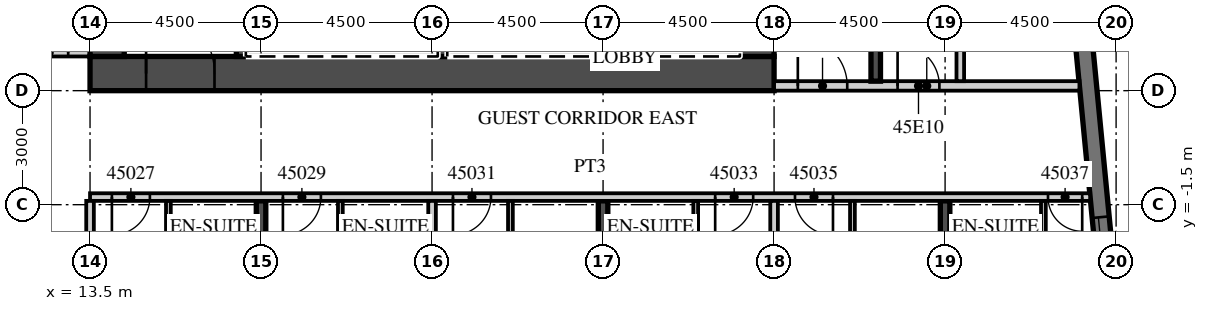
"""IFC4 building model, lengths in metres.
Left out: names, types, materials, properties, quantities, classifications, styles, units other than length and angle.
Written with IfcOpenShell. Run it as: python <this file> out.ifc"""

import sys

from ifc_helpers import new_model, si_unit, direction, frame, frame_2d, origin, place, context, subcontext, project, spatial, rectangle, extrude, element, fill, save


model = new_model("IFC4")
c1 = context("Model", 3, precision=1e-05, world=origin(), true_north=direction((0.0, 1.0)))
c2 = subcontext(c1, "Body", "Model", "MODEL_VIEW")
j1 = project(units=[si_unit("LENGTHUNIT", "METRE"), si_unit("PLANEANGLEUNIT", "RADIAN")], contexts=[c1])
p1 = place(None, origin())
s1 = spatial("IfcSite", under=j1, at=p1, CompositionType="ELEMENT")
p2 = place(p1, origin())
s2 = spatial("IfcBuilding", under=s1, at=p2, CompositionType="ELEMENT")
p3 = place(p2, frame((0.0, 0.0, 190.0)))
s3 = spatial("IfcBuildingStorey", under=s2, at=p3, CompositionType="ELEMENT", Elevation=190.0)
p4 = place(p3, frame((18.0, -19.245, 0.0), z_axis=(0.0, 0.0, 1.0), x_axis=(0.0, 1.0, 0.0)))
e1 = element("IfcWall", 1, at=p4, inside=s3, PredefinedType="SHEAR", context=c2, shape_type="SweptSolid", body=[
    extrude(rectangle(XDim=17.845, YDim=0.25, at=frame_2d((8.923, 0.0))), origin(), (0.0, 0.0, 1.0), 3.3),
])
p5 = place(p3, frame((27.0, -18.379, 0.0), z_axis=(0.0, 0.0, 1.0), x_axis=(0.0, 1.0, 0.0)))
e2 = element("IfcWall", 2, at=p5, inside=s3, PredefinedType="SHEAR", context=c2, shape_type="SweptSolid", body=[
    extrude(rectangle(XDim=16.979, YDim=0.25, at=frame_2d((8.489, 0.0))), origin(), (0.0, 0.0, 1.0), 3.3),
])
p6 = place(p3, frame((36.0, -17.512, 0.0), z_axis=(0.0, 0.0, 1.0), x_axis=(0.0, 1.0, 0.0)))
e3 = element("IfcWall", 3, at=p6, inside=s3, PredefinedType="SHEAR", context=c2, shape_type="SweptSolid", body=[
    extrude(rectangle(XDim=16.112, YDim=0.25, at=frame_2d((8.056, 0.0))), origin(), (0.0, 0.0, 1.0), 3.3),
])
p7 = place(p3, frame((41.214, -13.466, 0.0), z_axis=(0.0, 0.0, 1.0), x_axis=(-0.095847314626, 0.995396047952, 0.0)))
e4 = element("IfcWall", 4, at=p7, inside=s3, PredefinedType="SOLIDWALL", context=c2, shape_type="SweptSolid", body=[
    extrude(rectangle(XDim=34.0, YDim=0.45, at=frame_2d((17.0, 0.0))), origin(), (0.0, 0.0, 1.0), 3.02),
])
p8 = place(p7, frame((3.869, 0.0, 0.45)))
e5 = element("IfcOpeningElement", 5, at=p8, cuts=e4, PredefinedType="OPENING", context=c2, shape_type="SweptSolid", body=[
    extrude(rectangle(XDim=3.3, YDim=2.25, at=frame_2d((1.65, 1.125))), frame((0.0, 0.235, 0.0), z_axis=(0.0, -1.0, 0.0), x_axis=(1.0, 0.0, 0.0)), (0.0, 0.0, 1.0), 0.47),
])
p9 = place(p7, frame((8.39, 0.0, 0.45)))
e6 = element("IfcOpeningElement", 6, at=p9, cuts=e4, PredefinedType="OPENING", context=c2, shape_type="SweptSolid", body=[
    extrude(rectangle(XDim=3.3, YDim=2.25, at=frame_2d((1.65, 1.125))), frame((0.0, 0.235, 0.0), z_axis=(0.0, -1.0, 0.0), x_axis=(1.0, 0.0, 0.0)), (0.0, 0.0, 1.0), 0.47),
])
p10 = place(p3, frame((-13.5, 2.5, 0.0), z_axis=(0.0, 0.0, 1.0), x_axis=(1.0, 0.0, 0.0)))
e7 = element("IfcWall", 7, at=p10, inside=s3, PredefinedType="PARTITIONING", context=c2, shape_type="SweptSolid", body=[
    extrude(rectangle(XDim=27.0, YDim=0.2, at=frame_2d((13.5, 0.0))), origin(), (0.0, 0.0, 1.0), 3.02),
])
p11 = place(p10, frame((0.575, 0.0, 0.0)))
e8 = element("IfcOpeningElement", 8, at=p11, cuts=e7, PredefinedType="OPENING", context=c2, shape_type="SweptSolid", body=[
    extrude(rectangle(XDim=1.0, YDim=2.1, at=frame_2d((0.5, 1.05))), frame((0.0, 0.11, 0.0), z_axis=(0.0, -1.0, 0.0), x_axis=(1.0, 0.0, 0.0)), (0.0, 0.0, 1.0), 0.22),
])
p12 = place(p10, frame((9.863, 0.0, 0.0)))
e9 = element("IfcOpeningElement", 9, at=p12, cuts=e7, PredefinedType="OPENING", context=c2, shape_type="SweptSolid", body=[
    extrude(rectangle(XDim=1.2, YDim=2.1, at=frame_2d((0.6, 1.05))), frame((0.0, 0.11, 0.0), z_axis=(0.0, -1.0, 0.0), x_axis=(1.0, 0.0, 0.0)), (0.0, 0.0, 1.0), 0.22),
])
p13 = place(p10, frame((18.862, 0.0, 0.0)))
e10 = element("IfcOpeningElement", 10, at=p13, cuts=e7, PredefinedType="OPENING", context=c2, shape_type="SweptSolid", body=[
    extrude(rectangle(XDim=1.2, YDim=2.1, at=frame_2d((0.6, 1.05))), frame((0.0, 0.11, 0.0), z_axis=(0.0, -1.0, 0.0), x_axis=(1.0, 0.0, 0.0)), (0.0, 0.0, 1.0), 0.22),
])
p14 = place(p10, frame((25.425, 0.0, 0.0)))
e11 = element("IfcOpeningElement", 11, at=p14, cuts=e7, PredefinedType="OPENING", context=c2, shape_type="SweptSolid", body=[
    extrude(rectangle(XDim=1.0, YDim=2.1, at=frame_2d((0.5, 1.05))), frame((0.0, 0.11, 0.0), z_axis=(0.0, -1.0, 0.0), x_axis=(1.0, 0.0, 0.0)), (0.0, 0.0, 1.0), 0.22),
])
p15 = place(p3, frame((13.5, -1.3, 0.0), z_axis=(0.0, 0.0, 1.0), x_axis=(1.0, 0.0, 0.0)))
e12 = element("IfcWall", 12, at=p15, inside=s3, PredefinedType="PARTITIONING", context=c2, shape_type="SweptSolid", body=[
    extrude(rectangle(XDim=26.317, YDim=0.2, at=frame_2d((13.158, 0.0))), origin(), (0.0, 0.0, 1.0), 3.02),
])
p16 = place(p15, frame((0.575, 0.0, 0.0)))
e13 = element("IfcOpeningElement", 13, at=p16, cuts=e12, PredefinedType="OPENING", context=c2, shape_type="SweptSolid", body=[
    extrude(rectangle(XDim=1.0, YDim=2.1, at=frame_2d((0.5, 1.05))), frame((0.0, 0.11, 0.0), z_axis=(0.0, -1.0, 0.0), x_axis=(1.0, 0.0, 0.0)), (0.0, 0.0, 1.0), 0.22),
])
p17 = place(p15, frame((5.075, 0.0, 0.0)))
e14 = element("IfcOpeningElement", 14, at=p17, cuts=e12, PredefinedType="OPENING", context=c2, shape_type="SweptSolid", body=[
    extrude(rectangle(XDim=1.0, YDim=2.1, at=frame_2d((0.5, 1.05))), frame((0.0, 0.11, 0.0), z_axis=(0.0, -1.0, 0.0), x_axis=(1.0, 0.0, 0.0)), (0.0, 0.0, 1.0), 0.22),
])
p18 = place(p15, frame((9.55, 0.0, 0.0)))
e15 = element("IfcOpeningElement", 15, at=p18, cuts=e12, PredefinedType="OPENING", context=c2, shape_type="SweptSolid", body=[
    extrude(rectangle(XDim=1.0, YDim=2.1, at=frame_2d((0.5, 1.05))), frame((0.0, 0.11, 0.0), z_axis=(0.0, -1.0, 0.0), x_axis=(1.0, 0.0, 0.0)), (0.0, 0.0, 1.0), 0.22),
])
p19 = place(p15, frame((16.45, 0.0, 0.0)))
e16 = element("IfcOpeningElement", 16, at=p19, cuts=e12, PredefinedType="OPENING", context=c2, shape_type="SweptSolid", body=[
    extrude(rectangle(XDim=1.0, YDim=2.1, at=frame_2d((0.5, 1.05))), frame((0.0, 0.11, 0.0), z_axis=(0.0, -1.0, 0.0), x_axis=(1.0, 0.0, 0.0)), (0.0, 0.0, 1.0), 0.22),
])
p20 = place(p15, frame((18.55, 0.0, 0.0)))
e17 = element("IfcOpeningElement", 17, at=p20, cuts=e12, PredefinedType="OPENING", context=c2, shape_type="SweptSolid", body=[
    extrude(rectangle(XDim=1.0, YDim=2.1, at=frame_2d((0.5, 1.05))), frame((0.0, 0.11, 0.0), z_axis=(0.0, -1.0, 0.0), x_axis=(1.0, 0.0, 0.0)), (0.0, 0.0, 1.0), 0.22),
])
p21 = place(p15, frame((25.208, 0.0, 0.0)))
e18 = element("IfcOpeningElement", 18, at=p21, cuts=e12, PredefinedType="OPENING", context=c2, shape_type="SweptSolid", body=[
    extrude(rectangle(XDim=0.9, YDim=2.1, at=frame_2d((0.45, 1.05))), frame((0.0, 0.11, 0.0), z_axis=(0.0, -1.0, 0.0), x_axis=(1.0, 0.0, 0.0)), (0.0, 0.0, 1.0), 0.22),
])
p22 = place(p3, frame((13.5, -19.701, 0.0), z_axis=(0.0, 0.0, 1.0), x_axis=(0.0, 1.0, 0.0)))
e19 = element("IfcWall", 19, at=p22, inside=s3, PredefinedType="PARTITIONING", context=c2, shape_type="SweptSolid", body=[
    extrude(rectangle(XDim=18.301, YDim=0.2, at=frame_2d((9.15, 0.0))), origin(), (0.0, 0.0, 1.0), 3.02),
])
p23 = place(p3, frame((15.562, -5.125, 0.0), z_axis=(0.0, 0.0, 1.0), x_axis=(0.0, 1.0, 0.0)))
e20 = element("IfcWall", 20, at=p23, inside=s3, PredefinedType="PARTITIONING", context=c2, shape_type="SweptSolid", body=[
    extrude(rectangle(XDim=3.725, YDim=0.125, at=frame_2d((1.863, 0.0))), origin(), (0.0, 0.0, 1.0), 3.02),
])
p24 = place(p23, frame((0.375, 0.0, 0.0)))
e21 = element("IfcOpeningElement", 21, at=p24, cuts=e20, PredefinedType="OPENING", context=c2, shape_type="SweptSolid", body=[
    extrude(rectangle(XDim=0.9, YDim=2.1, at=frame_2d((0.45, 1.05))), frame((0.0, 0.073, 0.0), z_axis=(0.0, -1.0, 0.0), x_axis=(1.0, 0.0, 0.0)), (0.0, 0.0, 1.0), 0.145),
])
p25 = place(p3, frame((22.5, -18.834, 0.0), z_axis=(0.0, 0.0, 1.0), x_axis=(0.0, 1.0, 0.0)))
e22 = element("IfcWall", 22, at=p25, inside=s3, PredefinedType="PARTITIONING", context=c2, shape_type="SweptSolid", body=[
    extrude(rectangle(XDim=17.434, YDim=0.2, at=frame_2d((8.717, 0.0))), origin(), (0.0, 0.0, 1.0), 3.02),
])
p26 = place(p3, frame((20.087, -5.125, 0.0), z_axis=(0.0, 0.0, 1.0), x_axis=(0.0, 1.0, 0.0)))
e23 = element("IfcWall", 23, at=p26, inside=s3, PredefinedType="PARTITIONING", context=c2, shape_type="SweptSolid", body=[
    extrude(rectangle(XDim=3.725, YDim=0.125, at=frame_2d((1.863, 0.0))), origin(), (0.0, 0.0, 1.0), 3.02),
])
p27 = place(p26, frame((0.375, 0.0, 0.0)))
e24 = element("IfcOpeningElement", 24, at=p27, cuts=e23, PredefinedType="OPENING", context=c2, shape_type="SweptSolid", body=[
    extrude(rectangle(XDim=0.9, YDim=2.1, at=frame_2d((0.45, 1.05))), frame((0.0, 0.073, 0.0), z_axis=(0.0, -1.0, 0.0), x_axis=(1.0, 0.0, 0.0)), (0.0, 0.0, 1.0), 0.145),
])
p28 = place(p3, frame((24.562, -5.125, 0.0), z_axis=(0.0, 0.0, 1.0), x_axis=(0.0, 1.0, 0.0)))
e25 = element("IfcWall", 25, at=p28, inside=s3, PredefinedType="PARTITIONING", context=c2, shape_type="SweptSolid", body=[
    extrude(rectangle(XDim=3.725, YDim=0.125, at=frame_2d((1.863, 0.0))), origin(), (0.0, 0.0, 1.0), 3.02),
])
p29 = place(p28, frame((0.375, 0.0, 0.0)))
e26 = element("IfcOpeningElement", 26, at=p29, cuts=e25, PredefinedType="OPENING", context=c2, shape_type="SweptSolid", body=[
    extrude(rectangle(XDim=0.9, YDim=2.1, at=frame_2d((0.45, 1.05))), frame((0.0, 0.073, 0.0), z_axis=(0.0, -1.0, 0.0), x_axis=(1.0, 0.0, 0.0)), (0.0, 0.0, 1.0), 0.145),
])
p30 = place(p3, frame((31.5, -17.967, 0.0), z_axis=(0.0, 0.0, 1.0), x_axis=(0.0, 1.0, 0.0)))
e27 = element("IfcWall", 27, at=p30, inside=s3, PredefinedType="PARTITIONING", context=c2, shape_type="SweptSolid", body=[
    extrude(rectangle(XDim=16.567, YDim=0.2, at=frame_2d((8.284, 0.0))), origin(), (0.0, 0.0, 1.0), 3.02),
])
p31 = place(p3, frame((29.438, -5.125, 0.0), z_axis=(0.0, 0.0, 1.0), x_axis=(0.0, 1.0, 0.0)))
e28 = element("IfcWall", 28, at=p31, inside=s3, PredefinedType="PARTITIONING", context=c2, shape_type="SweptSolid", body=[
    extrude(rectangle(XDim=3.725, YDim=0.125, at=frame_2d((1.863, 0.0))), origin(), (0.0, 0.0, 1.0), 3.02),
])
p32 = place(p31, frame((0.375, 0.0, 0.0)))
e29 = element("IfcOpeningElement", 29, at=p32, cuts=e28, PredefinedType="OPENING", context=c2, shape_type="SweptSolid", body=[
    extrude(rectangle(XDim=0.9, YDim=2.1, at=frame_2d((0.45, 1.05))), frame((0.0, 0.073, 0.0), z_axis=(0.0, -1.0, 0.0), x_axis=(1.0, 0.0, 0.0)), (0.0, 0.0, 1.0), 0.145),
])
p33 = place(p3, frame((33.562, -5.125, 0.0), z_axis=(0.0, 0.0, 1.0), x_axis=(0.0, 1.0, 0.0)))
e30 = element("IfcWall", 30, at=p33, inside=s3, PredefinedType="PARTITIONING", context=c2, shape_type="SweptSolid", body=[
    extrude(rectangle(XDim=3.725, YDim=0.125, at=frame_2d((1.863, 0.0))), origin(), (0.0, 0.0, 1.0), 3.02),
])
p34 = place(p33, frame((0.375, 0.0, 0.0)))
e31 = element("IfcOpeningElement", 31, at=p34, cuts=e30, PredefinedType="OPENING", context=c2, shape_type="SweptSolid", body=[
    extrude(rectangle(XDim=0.9, YDim=2.1, at=frame_2d((0.45, 1.05))), frame((0.0, 0.073, 0.0), z_axis=(0.0, -1.0, 0.0), x_axis=(1.0, 0.0, 0.0)), (0.0, 0.0, 1.0), 0.145),
])
p35 = place(p3, frame((38.587, -5.125, 0.0), z_axis=(0.0, 0.0, 1.0), x_axis=(0.0, 1.0, 0.0)))
e32 = element("IfcWall", 32, at=p35, inside=s3, PredefinedType="PARTITIONING", context=c2, shape_type="SweptSolid", body=[
    extrude(rectangle(XDim=3.725, YDim=0.125, at=frame_2d((1.863, 0.0))), origin(), (0.0, 0.0, 1.0), 3.02),
])
p36 = place(p35, frame((0.375, 0.0, 0.0)))
e33 = element("IfcOpeningElement", 33, at=p36, cuts=e32, PredefinedType="OPENING", context=c2, shape_type="SweptSolid", body=[
    extrude(rectangle(XDim=0.9, YDim=2.1, at=frame_2d((0.45, 1.05))), frame((0.0, 0.073, 0.0), z_axis=(0.0, -1.0, 0.0), x_axis=(1.0, 0.0, 0.0)), (0.0, 0.0, 1.0), 0.145),
])
p37 = place(p3, frame((13.5, 1.95, 0.0), z_axis=(0.0, 0.0, 1.0), x_axis=(1.0, 0.0, 0.0)))
e34 = element("IfcWall", 34, at=p37, inside=s3, PredefinedType="SHEAR", context=c2, shape_type="SweptSolid", body=[
    extrude(rectangle(XDim=18.0, YDim=0.9, at=frame_2d((9.0, 0.0))), origin(), (0.0, 0.0, 1.0), 3.02),
])
p38 = place(p37, frame((1.475, 0.0, 0.0)))
e35 = element("IfcOpeningElement", 35, at=p38, cuts=e34, PredefinedType="OPENING", context=c2, shape_type="SweptSolid", body=[
    extrude(rectangle(XDim=1.8, YDim=2.1, at=frame_2d((0.9, 1.05))), frame((0.0, 0.46, 0.0), z_axis=(0.0, -1.0, 0.0), x_axis=(1.0, 0.0, 0.0)), (0.0, 0.0, 1.0), 0.92),
])
p39 = place(p3, frame((31.05, 2.4, 0.0), z_axis=(0.0, 0.0, 1.0), x_axis=(0.0, 1.0, 0.0)))
e36 = element("IfcWall", 36, at=p39, inside=s3, PredefinedType="SHEAR", context=c2, shape_type="SweptSolid", body=[
    extrude(rectangle(XDim=12.8, YDim=0.9, at=frame_2d((6.4, 0.0))), origin(), (0.0, 0.0, 1.0), 3.02),
])
p40 = place(p39, frame((0.2, 0.0, 0.0)))
e37 = element("IfcOpeningElement", 37, at=p40, cuts=e36, PredefinedType="OPENING", context=c2, shape_type="SweptSolid", body=[
    extrude(rectangle(XDim=1.1, YDim=2.1, at=frame_2d((0.55, 1.05))), frame((0.0, 0.46, 0.0), z_axis=(0.0, -1.0, 0.0), x_axis=(1.0, 0.0, 0.0)), (0.0, 0.0, 1.0), 0.92),
])
p41 = place(p3, frame((13.95, 2.4, 0.0), z_axis=(0.0, 0.0, 1.0), x_axis=(0.0, 1.0, 0.0)))
e38 = element("IfcWall", 38, at=p41, inside=s3, PredefinedType="SHEAR", context=c2, shape_type="SweptSolid", body=[
    extrude(rectangle(XDim=12.2, YDim=0.9, at=frame_2d((6.1, 0.0))), origin(), (0.0, 0.0, 1.0), 3.02),
])
p42 = place(p3, frame((17.475, 2.4, 0.0), z_axis=(0.0, 0.0, 1.0), x_axis=(0.0, 1.0, 0.0)))
e39 = element("IfcWall", 39, at=p42, inside=s3, PredefinedType="SHEAR", context=c2, shape_type="SweptSolid", body=[
    extrude(rectangle(XDim=3.15, YDim=0.25, at=frame_2d((1.575, 0.0))), origin(), (0.0, 0.0, 1.0), 3.02),
])
for number, where, z_axis, x_axis in (
    (40, (27.975, 2.4, 0.0), (0.0, 0.0, 1.0), (0.0, 1.0, 0.0)),
    (41, (22.775, 2.4, 0.0), (0.0, 0.0, 1.0), (0.0, 1.0, 0.0)),
):
    element("IfcWall", number, at=place(p3, frame(where, z_axis=z_axis, x_axis=x_axis)), inside=s3, PredefinedType="SHEAR", context=c2, shape_type="SweptSolid", body=[
        extrude(rectangle(XDim=2.9, YDim=0.25, at=frame_2d((1.45, 0.0))), origin(), (0.0, 0.0, 1.0), 3.02),
    ])
p43 = place(p3, frame((31.5, 1.625, 0.0), z_axis=(0.0, 0.0, 1.0), x_axis=(1.0, 0.0, 0.0)))
e42 = element("IfcWall", 42, at=p43, inside=s3, PredefinedType="PARTITIONING", context=c2, shape_type="SweptSolid", body=[
    extrude(rectangle(XDim=8.035, YDim=0.25, at=frame_2d((4.018, 0.0))), origin(), (0.0, 0.0, 1.0), 3.02),
])
p44 = place(p43, frame((0.625, 0.0, 0.0)))
e43 = element("IfcOpeningElement", 43, at=p44, cuts=e42, PredefinedType="OPENING", context=c2, shape_type="SweptSolid", body=[
    extrude(rectangle(XDim=1.3, YDim=2.1, at=frame_2d((0.65, 1.05))), frame((0.0, 0.135, 0.0), z_axis=(0.0, -1.0, 0.0), x_axis=(1.0, 0.0, 0.0)), (0.0, 0.0, 1.0), 0.27),
])
p45 = place(p43, frame((3.25, 0.0, 0.0)))
e44 = element("IfcOpeningElement", 44, at=p45, cuts=e42, PredefinedType="OPENING", context=c2, shape_type="SweptSolid", body=[
    extrude(rectangle(XDim=1.1, YDim=2.1, at=frame_2d((0.55, 1.05))), frame((0.0, 0.135, 0.0), z_axis=(0.0, -1.0, 0.0), x_axis=(1.0, 0.0, 0.0)), (0.0, 0.0, 1.0), 0.27),
])
p46 = place(p3, frame((34.175, 1.75, 0.0), z_axis=(0.0, 0.0, 1.0), x_axis=(0.0, 1.0, 0.0)))
e45 = element("IfcWall", 45, at=p46, inside=s3, PredefinedType="SHEAR", context=c2, shape_type="SweptSolid", body=[
    extrude(rectangle(XDim=8.35, YDim=0.25, at=frame_2d((4.175, 0.0))), origin(), (0.0, 0.0, 1.0), 3.02),
])
p47 = place(p3, frame((36.4, 1.75, 0.0), z_axis=(0.0, 0.0, 1.0), x_axis=(0.0, 1.0, 0.0)))
e46 = element("IfcWall", 46, at=p47, inside=s3, PredefinedType="PARTITIONING", context=c2, shape_type="SweptSolid", body=[
    extrude(rectangle(XDim=15.95, YDim=0.2, at=frame_2d((7.975, 0.0))), origin(), (0.0, 0.0, 1.0), 3.02),
])
p48 = place(p47, frame((14.7, 0.0, 0.0)))
e47 = element("IfcOpeningElement", 47, at=p48, cuts=e46, PredefinedType="OPENING", context=c2, shape_type="SweptSolid", body=[
    extrude(rectangle(XDim=0.9, YDim=2.1, at=frame_2d((0.45, 1.05))), frame((0.0, 0.11, 0.0), z_axis=(0.0, -1.0, 0.0), x_axis=(1.0, 0.0, 0.0)), (0.0, 0.0, 1.0), 0.22),
])
p49 = place(p9, origin())
e48 = element("IfcWindow", 48, at=p49, inside=s3, PartitioningType="SINGLE_PANEL", PredefinedType="WINDOW", context=c2, shape_type="SweptSolid", body=[
    extrude(rectangle(XDim=3.3, YDim=2.25, at=frame_2d((1.65, 1.125))), frame((0.0, 0.09, 0.0), z_axis=(0.0, -1.0, 0.0), x_axis=(1.0, 0.0, 0.0)), (0.0, 0.0, 1.0), 0.06),
])
fill(e6, e48)
p50 = place(p14, origin())
e49 = element("IfcDoor", 49, at=p50, inside=s3, OperationType="SINGLE_SWING_RIGHT", PredefinedType="DOOR", context=c2, shape_type="SweptSolid", body=[
    extrude(rectangle(XDim=1.0, YDim=2.1, at=frame_2d((0.5, 1.05))), frame((0.0, 0.025, 0.0), z_axis=(0.0, -1.0, 0.0), x_axis=(1.0, 0.0, 0.0)), (0.0, 0.0, 1.0), 0.05),
])
fill(e11, e49)
p51 = place(p16, origin())
e50 = element("IfcDoor", 50, at=p51, inside=s3, OperationType="SINGLE_SWING_LEFT", PredefinedType="DOOR", context=c2, shape_type="SweptSolid", body=[
    extrude(rectangle(XDim=1.0, YDim=2.1, at=frame_2d((0.5, 1.05))), frame((0.0, 0.025, 0.0), z_axis=(0.0, -1.0, 0.0), x_axis=(1.0, 0.0, 0.0)), (0.0, 0.0, 1.0), 0.05),
])
fill(e13, e50)
p52 = place(p17, origin())
e51 = element("IfcDoor", 51, at=p52, inside=s3, OperationType="SINGLE_SWING_LEFT", PredefinedType="DOOR", context=c2, shape_type="SweptSolid", body=[
    extrude(rectangle(XDim=1.0, YDim=2.1, at=frame_2d((0.5, 1.05))), frame((0.0, 0.025, 0.0), z_axis=(0.0, -1.0, 0.0), x_axis=(1.0, 0.0, 0.0)), (0.0, 0.0, 1.0), 0.05),
])
fill(e14, e51)
p53 = place(p18, origin())
e52 = element("IfcDoor", 52, at=p53, inside=s3, OperationType="SINGLE_SWING_LEFT", PredefinedType="DOOR", context=c2, shape_type="SweptSolid", body=[
    extrude(rectangle(XDim=1.0, YDim=2.1, at=frame_2d((0.5, 1.05))), frame((0.0, 0.025, 0.0), z_axis=(0.0, -1.0, 0.0), x_axis=(1.0, 0.0, 0.0)), (0.0, 0.0, 1.0), 0.05),
])
fill(e15, e52)
p54 = place(p19, origin())
e53 = element("IfcDoor", 53, at=p54, inside=s3, OperationType="SINGLE_SWING_LEFT", PredefinedType="DOOR", context=c2, shape_type="SweptSolid", body=[
    extrude(rectangle(XDim=1.0, YDim=2.1, at=frame_2d((0.5, 1.05))), frame((0.0, 0.025, 0.0), z_axis=(0.0, -1.0, 0.0), x_axis=(1.0, 0.0, 0.0)), (0.0, 0.0, 1.0), 0.05),
])
fill(e16, e53)
p55 = place(p20, origin())
e54 = element("IfcDoor", 54, at=p55, inside=s3, OperationType="SINGLE_SWING_RIGHT", PredefinedType="DOOR", context=c2, shape_type="SweptSolid", body=[
    extrude(rectangle(XDim=1.0, YDim=2.1, at=frame_2d((0.5, 1.05))), frame((0.0, 0.025, 0.0), z_axis=(0.0, -1.0, 0.0), x_axis=(1.0, 0.0, 0.0)), (0.0, 0.0, 1.0), 0.05),
])
fill(e17, e54)
p56 = place(p21, origin())
e55 = element("IfcDoor", 55, at=p56, inside=s3, OperationType="SINGLE_SWING_RIGHT", PredefinedType="DOOR", context=c2, shape_type="SweptSolid", body=[
    extrude(rectangle(XDim=0.9, YDim=2.1, at=frame_2d((0.45, 1.05))), frame((0.0, 0.025, 0.0), z_axis=(0.0, -1.0, 0.0), x_axis=(1.0, 0.0, 0.0)), (0.0, 0.0, 1.0), 0.05),
])
fill(e18, e55)
p57 = place(p38, origin())
e56 = element("IfcDoor", 56, at=p57, inside=s3, OperationType="DOUBLE_DOOR_DOUBLE_SWING", PredefinedType="DOOR", context=c2, shape_type="SweptSolid", body=[
    extrude(rectangle(XDim=1.8, YDim=2.1, at=frame_2d((0.9, 1.05))), frame((0.0, 0.025, 0.0), z_axis=(0.0, -1.0, 0.0), x_axis=(1.0, 0.0, 0.0)), (0.0, 0.0, 1.0), 0.05),
])
fill(e35, e56)
p58 = place(p44, origin())
e57 = element("IfcDoor", 57, at=p58, inside=s3, OperationType="SINGLE_SWING_LEFT", PredefinedType="DOOR", context=c2, shape_type="SweptSolid", body=[
    extrude(rectangle(XDim=1.3, YDim=2.1, at=frame_2d((0.65, 1.05))), frame((0.0, 0.025, 0.0), z_axis=(0.0, -1.0, 0.0), x_axis=(1.0, 0.0, 0.0)), (0.0, 0.0, 1.0), 0.05),
])
fill(e43, e57)
p59 = place(p45, origin())
e58 = element("IfcDoor", 58, at=p59, inside=s3, OperationType="SINGLE_SWING_LEFT", PredefinedType="DOOR", context=c2, shape_type="SweptSolid", body=[
    extrude(rectangle(XDim=1.1, YDim=2.1, at=frame_2d((0.55, 1.05))), frame((0.0, 0.025, 0.0), z_axis=(0.0, -1.0, 0.0), x_axis=(1.0, 0.0, 0.0)), (0.0, 0.0, 1.0), 0.05),
])
fill(e44, e58)
save(model, sys.argv[1])
